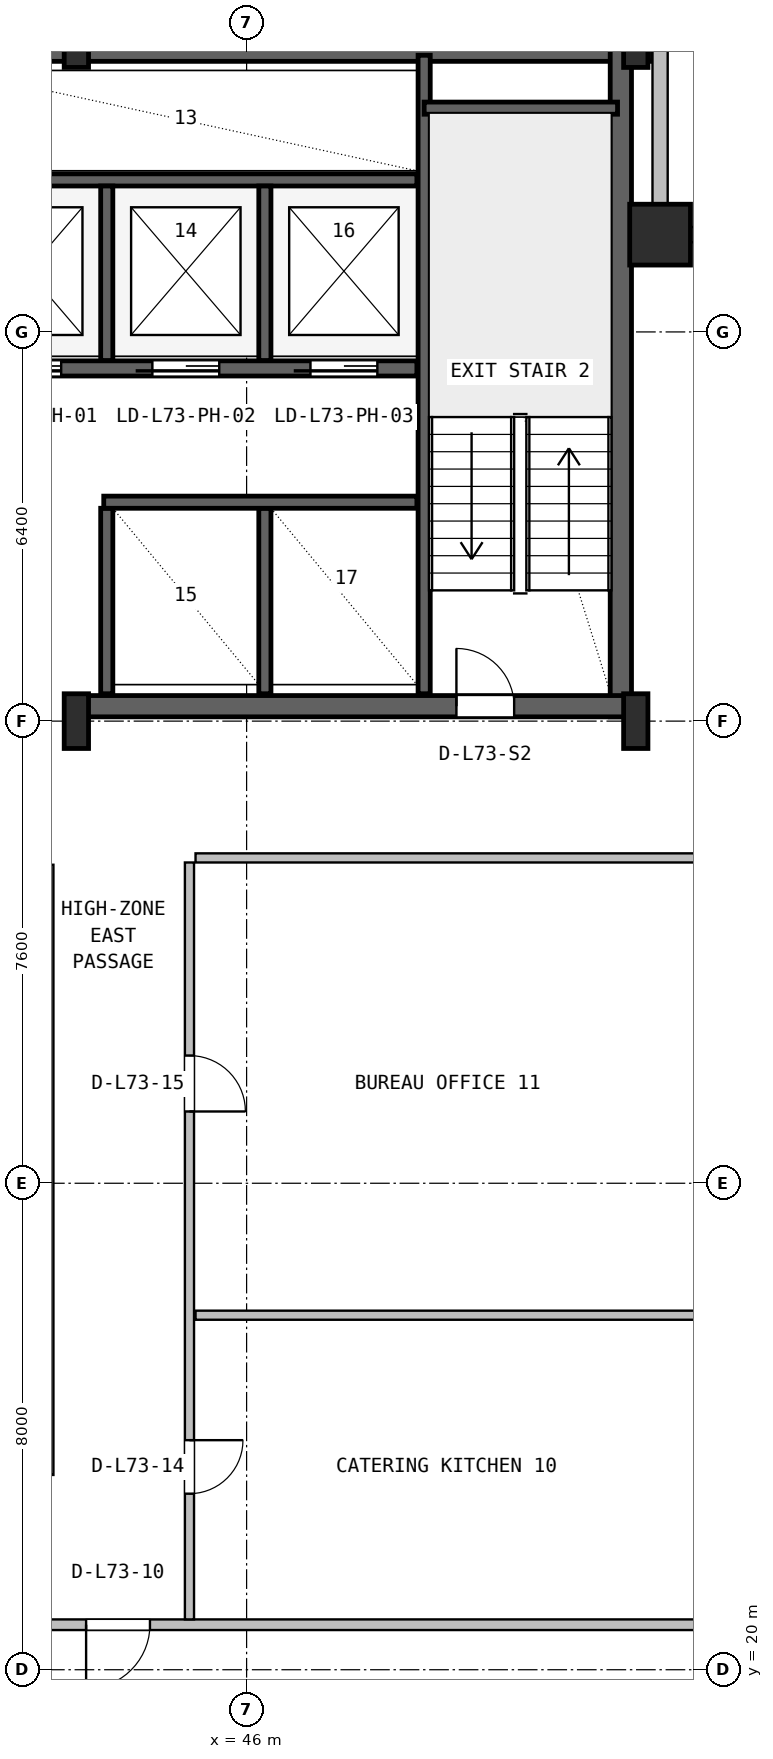
"""IFC4 building model, lengths in metres.
Left out: names, types, materials, properties, quantities, classifications, styles, units other than length and angle.
Written with IfcOpenShell. Run it as: python <this file> out.ifc"""

import sys

from ifc_helpers import new_model, si_unit, direction, frame, frame_2d, origin, origin_2d, place, context, subcontext, project, spatial, rectangle, hollow_rectangle, i_section, extrude, source, transform, mapped, element, fill, save


model = new_model("IFC4")
c1 = context("Model", 3, precision=1e-05, world=origin(), true_north=direction((0.0, 1.0)))
c2 = subcontext(c1, "Body", "Model", "MODEL_VIEW")
j1 = project(units=[si_unit("LENGTHUNIT", "METRE"), si_unit("PLANEANGLEUNIT", "RADIAN")], contexts=[c1])
p1 = place(None, origin())
s1 = spatial("IfcSite", under=j1, at=p1, CompositionType="ELEMENT")
p2 = place(p1, origin())
s2 = spatial("IfcBuilding", under=s1, at=p2, CompositionType="ELEMENT")
p3 = place(p2, frame((0.0, 0.0, 292.6)))
s3 = spatial("IfcBuildingStorey", under=s2, at=p3, CompositionType="ELEMENT", Elevation=292.6)
p4 = place(p3, frame((15.325, 46.625, 0.0), z_axis=(0.0, 0.0, 1.0), x_axis=(1.0, 0.0, 0.0)))
e1 = element("IfcWall", 1, at=p4, inside=s3, PredefinedType="SHEAR", context=c2, shape_type="SweptSolid", body=[
    extrude(rectangle(XDim=37.35, YDim=0.35, at=frame_2d((18.675, 0.0))), origin(), (0.0, 0.0, 1.0), 3.55),
])
p5 = place(p3, frame((52.155, 35.67, 0.0), z_axis=(0.0, 0.0, 1.0), x_axis=(0.0, 1.0, 0.0)))
e2 = element("IfcWall", 2, at=p5, inside=s3, PredefinedType="SHEAR", context=c2, shape_type="SweptSolid", body=[
    extrude(rectangle(XDim=11.13, YDim=0.35, at=frame_2d((5.565, 0.0))), origin(), (0.0, 0.0, 1.0), 3.55),
])
p6 = place(p3, frame((43.2, 35.845, 0.0), z_axis=(0.0, 0.0, 1.0), x_axis=(1.0, 0.0, 0.0)))
e3 = element("IfcWall", 3, at=p6, inside=s3, PredefinedType="SHEAR", context=c2, shape_type="SweptSolid", body=[
    extrude(rectangle(XDim=9.13, YDim=0.35, at=frame_2d((4.565, 0.0))), origin(), (0.0, 0.0, 1.0), 3.55),
])
p7 = place(p6, frame((6.25, 0.0, 0.0)))
e4 = element("IfcOpeningElement", 4, at=p7, cuts=e3, PredefinedType="OPENING", context=c2, shape_type="SweptSolid", body=[
    extrude(rectangle(XDim=0.95, YDim=2.1, at=frame_2d((0.475, 1.05))), frame((0.0, 0.185, 0.0), z_axis=(0.0, -1.0, 0.0), x_axis=(1.0, 0.0, 0.0)), (0.0, 0.0, 1.0), 0.37),
])
m1 = source(origin(), c2, "Body", "SweptSolid", [
    extrude(i_section(OverallWidth=0.4, OverallDepth=0.9, WebThickness=0.016, FlangeThickness=0.028, FilletRadius=0.016, at=origin_2d()), origin(), (0.0, 0.0, 1.0), 3.8),
])
for number, where, z_axis, x_axis in (
    (5, (43.2, 35.6, 0.0), (0.0, 0.0, 1.0), (1.0, 0.0, 0.0)),
    (6, (43.2, 46.8, 0.0), (0.0, 0.0, 1.0), (1.0, 0.0, 0.0)),
    (7, (52.4, 35.6, 0.0), (0.0, 0.0, 1.0), (1.0, 0.0, 0.0)),
    (8, (52.4, 46.8, 0.0), (0.0, 0.0, 1.0), (1.0, 0.0, 0.0)),
):
    element("IfcColumn", number, at=place(p3, frame(where, z_axis=z_axis, x_axis=x_axis)), inside=s3, PredefinedType="COLUMN", context=c2, shape_type="MappedRepresentation", body=[
        mapped(m1, transform((0.0, 0.0, 0.0), x_axis=(1.0, 0.0, 0.0), y_axis=(0.0, 1.0, 0.0), z_axis=(0.0, 0.0, 1.0), scale=1.0)),
    ])
m2 = source(origin(), c2, "Body", "SweptSolid", [
    extrude(hollow_rectangle(XDim=1.0, YDim=1.0, WallThickness=0.04, at=origin_2d()), origin(), (0.0, 0.0, 1.0), 3.8),
])
p8 = place(p3, frame((52.8, 43.6, 0.0), z_axis=(0.0, 0.0, 1.0), x_axis=(1.0, 0.0, 0.0)))
e9 = element("IfcColumn", 9, at=p8, inside=s3, PredefinedType="COLUMN", context=c2, shape_type="MappedRepresentation", body=[
    mapped(m2, transform((0.0, 0.0, 0.0), x_axis=(1.0, 0.0, 0.0), y_axis=(0.0, 1.0, 0.0), z_axis=(0.0, 0.0, 1.0), scale=1.0)),
])
p9 = place(p3, frame((52.93, 43.6, 0.0), z_axis=(0.0, 0.0, 1.0), x_axis=(1.0, 0.0, 0.0)))
e10 = element("IfcWall", 10, at=p9, inside=s3, PredefinedType="SOLIDWALL", context=c2, shape_type="SweptSolid", body=[
    extrude(rectangle(XDim=2.99, YDim=0.25, at=frame_2d((1.495, 0.0))), origin(), (0.0, 0.0, 1.0), 3.53),
])
p10 = place(p3, frame((52.8, 43.52, 0.0), z_axis=(0.0, 0.0, 1.0), x_axis=(0.0, 1.0, 0.0)))
e11 = element("IfcWall", 11, at=p10, inside=s3, PredefinedType="SOLIDWALL", context=c2, shape_type="SweptSolid", body=[
    extrude(rectangle(XDim=3.2, YDim=0.25, at=frame_2d((1.6, 0.0))), origin(), (0.0, 0.0, 1.0), 3.171),
])
p11 = place(p3, frame((48.92, 36.05, 0.0), z_axis=(0.0, 0.0, 1.0), x_axis=(0.0, 1.0, 0.0)))
e12 = element("IfcWall", 12, at=p11, inside=s3, PredefinedType="SHEAR", context=c2, shape_type="SweptSolid", body=[
    extrude(rectangle(XDim=10.5, YDim=0.2, at=frame_2d((5.25, 0.0))), origin(), (0.0, 0.0, 1.0), 3.55),
])
p12 = place(p3, frame((48.92, 45.68, 0.0), z_axis=(0.0, 0.0, 1.0), x_axis=(1.0, 0.0, 0.0)))
e13 = element("IfcWall", 13, at=p12, inside=s3, PredefinedType="SHEAR", context=c2, shape_type="SweptSolid", body=[
    extrude(rectangle(XDim=3.18, YDim=0.2, at=frame_2d((1.59, 0.0))), origin(), (0.0, 0.0, 1.0), 3.55),
])
p13 = place(p3, frame((24.98, 41.4, 0.0), z_axis=(0.0, 0.0, 1.0), x_axis=(1.0, 0.0, 0.0)))
e14 = element("IfcWall", 14, at=p13, inside=s3, PredefinedType="SHEAR", context=c2, shape_type="SweptSolid", body=[
    extrude(rectangle(XDim=23.82, YDim=0.25, at=frame_2d((11.91, 0.0))), origin(), (0.0, 0.0, 1.0), 3.55),
])
p14 = place(p13, frame((16.87, 0.0, 0.0)))
e15 = element("IfcOpeningElement", 15, at=p14, cuts=e14, PredefinedType="OPENING", context=c2, shape_type="SweptSolid", body=[
    extrude(rectangle(XDim=1.1, YDim=2.18, at=frame_2d((0.55, 1.09))), frame((0.0, 0.135, 0.0), z_axis=(0.0, -1.0, 0.0), x_axis=(1.0, 0.0, 0.0)), (0.0, 0.0, 1.0), 0.27),
])
p15 = place(p13, frame((19.47, 0.0, 0.0)))
e16 = element("IfcOpeningElement", 16, at=p15, cuts=e14, PredefinedType="OPENING", context=c2, shape_type="SweptSolid", body=[
    extrude(rectangle(XDim=1.1, YDim=2.18, at=frame_2d((0.55, 1.09))), frame((0.0, 0.135, 0.0), z_axis=(0.0, -1.0, 0.0), x_axis=(1.0, 0.0, 0.0)), (0.0, 0.0, 1.0), 0.27),
])
p16 = place(p13, frame((22.07, 0.0, 0.0)))
e17 = element("IfcOpeningElement", 17, at=p16, cuts=e14, PredefinedType="OPENING", context=c2, shape_type="SweptSolid", body=[
    extrude(rectangle(XDim=1.1, YDim=2.18, at=frame_2d((0.55, 1.09))), frame((0.0, 0.135, 0.0), z_axis=(0.0, -1.0, 0.0), x_axis=(1.0, 0.0, 0.0)), (0.0, 0.0, 1.0), 0.27),
])
p17 = place(p13, frame((1.81, 0.0, 0.0)))
e18 = element("IfcOpeningElement", 18, at=p17, cuts=e14, PredefinedType="OPENING", context=c2, shape_type="SweptSolid", body=[
    extrude(rectangle(XDim=0.92, YDim=2.08, at=frame_2d((0.46, 1.04))), frame((0.0, 0.135, 0.0), z_axis=(0.0, -1.0, 0.0), x_axis=(1.0, 0.0, 0.0)), (0.0, 0.0, 1.0), 0.27),
])
p18 = place(p13, frame((5.71, 0.0, 0.0)))
e19 = element("IfcOpeningElement", 19, at=p18, cuts=e14, PredefinedType="OPENING", context=c2, shape_type="SweptSolid", body=[
    extrude(rectangle(XDim=0.92, YDim=2.08, at=frame_2d((0.46, 1.04))), frame((0.0, 0.135, 0.0), z_axis=(0.0, -1.0, 0.0), x_axis=(1.0, 0.0, 0.0)), (0.0, 0.0, 1.0), 0.27),
])
p19 = place(p13, frame((9.21, 0.0, 0.0)))
e20 = element("IfcOpeningElement", 20, at=p19, cuts=e14, PredefinedType="OPENING", context=c2, shape_type="SweptSolid", body=[
    extrude(rectangle(XDim=0.92, YDim=2.08, at=frame_2d((0.46, 1.04))), frame((0.0, 0.135, 0.0), z_axis=(0.0, -1.0, 0.0), x_axis=(1.0, 0.0, 0.0)), (0.0, 0.0, 1.0), 0.27),
])
p20 = place(p13, frame((11.96, 0.0, 0.0)))
e21 = element("IfcOpeningElement", 21, at=p20, cuts=e14, PredefinedType="OPENING", context=c2, shape_type="SweptSolid", body=[
    extrude(rectangle(XDim=0.92, YDim=2.08, at=frame_2d((0.46, 1.04))), frame((0.0, 0.135, 0.0), z_axis=(0.0, -1.0, 0.0), x_axis=(1.0, 0.0, 0.0)), (0.0, 0.0, 1.0), 0.27),
])
p21 = place(p13, frame((14.31, 0.0, 0.0)))
e22 = element("IfcOpeningElement", 22, at=p21, cuts=e14, PredefinedType="OPENING", context=c2, shape_type="SweptSolid", body=[
    extrude(rectangle(XDim=0.92, YDim=2.08, at=frame_2d((0.46, 1.04))), frame((0.0, 0.135, 0.0), z_axis=(0.0, -1.0, 0.0), x_axis=(1.0, 0.0, 0.0)), (0.0, 0.0, 1.0), 0.27),
])
p22 = place(p3, frame((41.22, 44.5, 0.0), z_axis=(0.0, 0.0, 1.0), x_axis=(1.0, 0.0, 0.0)))
e23 = element("IfcWall", 23, at=p22, inside=s3, PredefinedType="SHEAR", context=c2, shape_type="SweptSolid", body=[
    extrude(rectangle(XDim=7.58, YDim=0.2, at=frame_2d((3.79, 0.0))), origin(), (0.0, 0.0, 1.0), 3.55),
])
for number, where, z_axis, x_axis in (
    (24, (43.7, 41.53, 0.0), (0.0, 0.0, 1.0), (0.0, 1.0, 0.0)),
    (25, (46.3, 41.53, 0.0), (0.0, 0.0, 1.0), (0.0, 1.0, 0.0)),
):
    element("IfcWall", number, at=place(p3, frame(where, z_axis=z_axis, x_axis=x_axis)), inside=s3, PredefinedType="SHEAR", context=c2, shape_type="SweptSolid", body=[
        extrude(rectangle(XDim=2.87, YDim=0.2, at=frame_2d((1.435, 0.0))), origin(), (0.0, 0.0, 1.0), 3.55),
    ])
for number, where, z_axis, x_axis in (
    (26, (43.7, 36.05, 0.0), (0.0, 0.0, 1.0), (0.0, 1.0, 0.0)),
    (27, (46.3, 36.05, 0.0), (0.0, 0.0, 1.0), (0.0, 1.0, 0.0)),
):
    element("IfcWall", number, at=place(p3, frame(where, z_axis=z_axis, x_axis=x_axis)), inside=s3, PredefinedType="SHEAR", context=c2, shape_type="SweptSolid", body=[
        extrude(rectangle(XDim=3.05, YDim=0.2, at=frame_2d((1.525, 0.0))), origin(), (0.0, 0.0, 1.0), 3.55),
    ])
p23 = place(p3, frame((43.65, 39.2, 0.0), z_axis=(0.0, 0.0, 1.0), x_axis=(1.0, 0.0, 0.0)))
e28 = element("IfcWall", 28, at=p23, inside=s3, PredefinedType="SHEAR", context=c2, shape_type="SweptSolid", body=[
    extrude(rectangle(XDim=5.15, YDim=0.2, at=frame_2d((2.575, 0.0))), origin(), (0.0, 0.0, 1.0), 3.55),
])
p24 = place(p3, frame((12.18, 20.74, 0.0), z_axis=(0.0, 0.0, 1.0), x_axis=(1.0, 0.0, 0.0)))
e29 = element("IfcWall", 29, at=p24, inside=s3, PredefinedType="PARTITIONING", context=c2, shape_type="SweptSolid", body=[
    extrude(rectangle(XDim=43.64, YDim=0.175, at=frame_2d((21.82, 0.0))), origin(), (0.0, 0.0, 1.0), 2.981),
])
p25 = place(p24, frame((12.09, 0.0, 0.0)))
e30 = element("IfcOpeningElement", 30, at=p25, cuts=e29, PredefinedType="OPENING", context=c2, shape_type="SweptSolid", body=[
    extrude(rectangle(XDim=1.05, YDim=2.1, at=frame_2d((0.525, 1.05))), frame((0.0, 0.098, 0.0), z_axis=(0.0, -1.0, 0.0), x_axis=(1.0, 0.0, 0.0)), (0.0, 0.0, 1.0), 0.195),
])
p26 = place(p24, frame((15.205, 0.0, 0.0)))
e31 = element("IfcOpeningElement", 31, at=p26, cuts=e29, PredefinedType="OPENING", context=c2, shape_type="SweptSolid", body=[
    extrude(rectangle(XDim=1.4, YDim=2.12, at=frame_2d((0.7, 1.06))), frame((0.0, 0.098, 0.0), z_axis=(0.0, -1.0, 0.0), x_axis=(1.0, 0.0, 0.0)), (0.0, 0.0, 1.0), 0.195),
])
p27 = place(p24, frame((20.215, 0.0, 0.0)))
e32 = element("IfcOpeningElement", 32, at=p27, cuts=e29, PredefinedType="OPENING", context=c2, shape_type="SweptSolid", body=[
    extrude(rectangle(XDim=0.88, YDim=2.06, at=frame_2d((0.44, 1.03))), frame((0.0, 0.098, 0.0), z_axis=(0.0, -1.0, 0.0), x_axis=(1.0, 0.0, 0.0)), (0.0, 0.0, 1.0), 0.195),
])
p28 = place(p24, frame((24.33, 0.0, 0.0)))
e33 = element("IfcOpeningElement", 33, at=p28, cuts=e29, PredefinedType="OPENING", context=c2, shape_type="SweptSolid", body=[
    extrude(rectangle(XDim=0.92, YDim=2.08, at=frame_2d((0.46, 1.04))), frame((0.0, 0.098, 0.0), z_axis=(0.0, -1.0, 0.0), x_axis=(1.0, 0.0, 0.0)), (0.0, 0.0, 1.0), 0.195),
])
p29 = place(p24, frame((27.91, 0.0, 0.0)))
e34 = element("IfcOpeningElement", 34, at=p29, cuts=e29, PredefinedType="OPENING", context=c2, shape_type="SweptSolid", body=[
    extrude(rectangle(XDim=1.0, YDim=2.1, at=frame_2d((0.5, 1.05))), frame((0.0, 0.098, 0.0), z_axis=(0.0, -1.0, 0.0), x_axis=(1.0, 0.0, 0.0)), (0.0, 0.0, 1.0), 0.195),
])
p30 = place(p24, frame((31.18, 0.0, 0.0)))
e35 = element("IfcOpeningElement", 35, at=p30, cuts=e29, PredefinedType="OPENING", context=c2, shape_type="SweptSolid", body=[
    extrude(rectangle(XDim=1.05, YDim=2.1, at=frame_2d((0.525, 1.05))), frame((0.0, 0.098, 0.0), z_axis=(0.0, -1.0, 0.0), x_axis=(1.0, 0.0, 0.0)), (0.0, 0.0, 1.0), 0.195),
])
p31 = place(p3, frame((42.71, 23.203, 0.0), z_axis=(0.0, 0.0, 1.0), x_axis=(0.0, 1.0, 0.0)))
e36 = element("IfcWall", 36, at=p31, inside=s3, PredefinedType="PARTITIONING", context=c2, shape_type="SweptSolid", body=[
    extrude(rectangle(XDim=10.035, YDim=0.225, at=frame_2d((5.018, 0.0))), origin(), (0.0, 0.0, 1.0), 2.981),
])
p32 = place(p3, frame((45.16, 25.83, 0.0), z_axis=(0.0, 0.0, 1.0), x_axis=(1.0, 0.0, 0.0)))
e37 = element("IfcWall", 37, at=p32, inside=s3, PredefinedType="PARTITIONING", context=c2, shape_type="SweptSolid", body=[
    extrude(rectangle(XDim=10.66, YDim=0.15, at=frame_2d((5.33, 0.0))), origin(), (0.0, 0.0, 1.0), 3.171),
])
p33 = place(p3, frame((45.06, 20.827, 0.0), z_axis=(0.0, 0.0, 1.0), x_axis=(0.0, 1.0, 0.0)))
e38 = element("IfcWall", 38, at=p33, inside=s3, PredefinedType="PARTITIONING", context=c2, shape_type="SweptSolid", body=[
    extrude(rectangle(XDim=12.448, YDim=0.15, at=frame_2d((6.224, 0.0))), origin(), (0.0, 0.0, 1.0), 3.222),
])
p34 = place(p33, frame((2.068, 0.0, 0.0)))
e39 = element("IfcOpeningElement", 39, at=p34, cuts=e38, PredefinedType="OPENING", context=c2, shape_type="SweptSolid", body=[
    extrude(rectangle(XDim=0.88, YDim=2.06, at=frame_2d((0.44, 1.03))), frame((0.0, 0.085, 0.0), z_axis=(0.0, -1.0, 0.0), x_axis=(1.0, 0.0, 0.0)), (0.0, 0.0, 1.0), 0.17),
])
p35 = place(p33, frame((8.353, 0.0, 0.0)))
e40 = element("IfcOpeningElement", 40, at=p35, cuts=e38, PredefinedType="OPENING", context=c2, shape_type="SweptSolid", body=[
    extrude(rectangle(XDim=0.92, YDim=2.08, at=frame_2d((0.46, 1.04))), frame((0.0, 0.085, 0.0), z_axis=(0.0, -1.0, 0.0), x_axis=(1.0, 0.0, 0.0)), (0.0, 0.0, 1.0), 0.17),
])
p36 = place(p3, frame((45.16, 33.35, 0.0), z_axis=(0.0, 0.0, 1.0), x_axis=(1.0, 0.0, 0.0)))
e41 = element("IfcWall", 41, at=p36, inside=s3, PredefinedType="PARTITIONING", context=c2, shape_type="SweptSolid", body=[
    extrude(rectangle(XDim=10.66, YDim=0.15, at=frame_2d((5.33, 0.0))), origin(), (0.0, 0.0, 1.0), 3.171),
])
m3 = source(origin(), c2, "Body", "SweptSolid", [
    extrude(rectangle(XDim=0.95, YDim=2.1, at=frame_2d((0.475, 1.05))), frame((0.0, 0.025, 0.0), z_axis=(0.0, -1.0, 0.0), x_axis=(1.0, 0.0, 0.0)), (0.0, 0.0, 1.0), 0.05),
])
p37 = place(p7, origin())
e42 = element("IfcDoor", 42, at=p37, inside=s3, OperationType="SINGLE_SWING_LEFT", PredefinedType="DOOR", context=c2, shape_type="MappedRepresentation", body=[
    mapped(m3, transform((0.0, 0.0, 0.0), x_axis=(1.0, 0.0, 0.0), y_axis=(0.0, 1.0, 0.0), z_axis=(0.0, 0.0, 1.0), scale=1.0)),
])
fill(e4, e42)
m4 = source(origin(), c2, "Body", "SweptSolid", [
    extrude(rectangle(XDim=1.1, YDim=2.18, at=frame_2d((0.55, 1.09))), frame((0.0, 0.025, 0.0), z_axis=(0.0, -1.0, 0.0), x_axis=(1.0, 0.0, 0.0)), (0.0, 0.0, 1.0), 0.05),
])
p38 = place(p14, frame((1.1, 0.0, 0.0), z_axis=(0.0, 0.0, 1.0), x_axis=(-1.0, 0.0, 0.0)))
e43 = element("IfcDoor", 43, at=p38, inside=s3, OperationType="SLIDING_TO_LEFT", PredefinedType="DOOR", context=c2, shape_type="MappedRepresentation", body=[
    mapped(m4, transform((0.0, 0.0, 0.0), x_axis=(1.0, 0.0, 0.0), y_axis=(0.0, 1.0, 0.0), z_axis=(0.0, 0.0, 1.0), scale=1.0)),
])
fill(e15, e43)
p39 = place(p15, frame((1.1, 0.0, 0.0), z_axis=(0.0, 0.0, 1.0), x_axis=(-1.0, 0.0, 0.0)))
e44 = element("IfcDoor", 44, at=p39, inside=s3, OperationType="SLIDING_TO_LEFT", PredefinedType="DOOR", context=c2, shape_type="MappedRepresentation", body=[
    mapped(m4, transform((0.0, 0.0, 0.0), x_axis=(1.0, 0.0, 0.0), y_axis=(0.0, 1.0, 0.0), z_axis=(0.0, 0.0, 1.0), scale=1.0)),
])
fill(e16, e44)
p40 = place(p16, frame((1.1, 0.0, 0.0), z_axis=(0.0, 0.0, 1.0), x_axis=(-1.0, 0.0, 0.0)))
e45 = element("IfcDoor", 45, at=p40, inside=s3, OperationType="SLIDING_TO_LEFT", PredefinedType="DOOR", context=c2, shape_type="MappedRepresentation", body=[
    mapped(m4, transform((0.0, 0.0, 0.0), x_axis=(1.0, 0.0, 0.0), y_axis=(0.0, 1.0, 0.0), z_axis=(0.0, 0.0, 1.0), scale=1.0)),
])
fill(e17, e45)
m5 = source(origin(), c2, "Body", "SweptSolid", [
    extrude(rectangle(XDim=1.05, YDim=2.1, at=frame_2d((0.525, 1.05))), frame((0.0, 0.025, 0.0), z_axis=(0.0, -1.0, 0.0), x_axis=(1.0, 0.0, 0.0)), (0.0, 0.0, 1.0), 0.05),
])
p41 = place(p30, frame((1.05, 0.0, 0.0), z_axis=(0.0, 0.0, 1.0), x_axis=(-1.0, 0.0, 0.0)))
e46 = element("IfcDoor", 46, at=p41, inside=s3, OperationType="SINGLE_SWING_LEFT", PredefinedType="DOOR", context=c2, shape_type="MappedRepresentation", body=[
    mapped(m5, transform((0.0, 0.0, 0.0), x_axis=(1.0, 0.0, 0.0), y_axis=(0.0, 1.0, 0.0), z_axis=(0.0, 0.0, 1.0), scale=1.0)),
])
fill(e35, e46)
m6 = source(origin(), c2, "Body", "SweptSolid", [
    extrude(rectangle(XDim=0.88, YDim=2.06, at=frame_2d((0.44, 1.03))), frame((0.0, 0.025, 0.0), z_axis=(0.0, -1.0, 0.0), x_axis=(1.0, 0.0, 0.0)), (0.0, 0.0, 1.0), 0.05),
])
p42 = place(p34, frame((0.88, 0.0, 0.0), z_axis=(0.0, 0.0, 1.0), x_axis=(-1.0, 0.0, 0.0)))
e47 = element("IfcDoor", 47, at=p42, inside=s3, OperationType="SINGLE_SWING_RIGHT", PredefinedType="DOOR", context=c2, shape_type="MappedRepresentation", body=[
    mapped(m6, transform((0.0, 0.0, 0.0), x_axis=(1.0, 0.0, 0.0), y_axis=(0.0, 1.0, 0.0), z_axis=(0.0, 0.0, 1.0), scale=1.0)),
])
fill(e39, e47)
m7 = source(origin(), c2, "Body", "SweptSolid", [
    extrude(rectangle(XDim=0.92, YDim=2.08, at=frame_2d((0.46, 1.04))), frame((0.0, 0.025, 0.0), z_axis=(0.0, -1.0, 0.0), x_axis=(1.0, 0.0, 0.0)), (0.0, 0.0, 1.0), 0.05),
])
p43 = place(p35, frame((0.92, 0.0, 0.0), z_axis=(0.0, 0.0, 1.0), x_axis=(-1.0, 0.0, 0.0)))
e48 = element("IfcDoor", 48, at=p43, inside=s3, OperationType="SINGLE_SWING_LEFT", PredefinedType="DOOR", context=c2, shape_type="MappedRepresentation", body=[
    mapped(m7, transform((0.0, 0.0, 0.0), x_axis=(1.0, 0.0, 0.0), y_axis=(0.0, 1.0, 0.0), z_axis=(0.0, 0.0, 1.0), scale=1.0)),
])
fill(e40, e48)
save(model, sys.argv[1])
